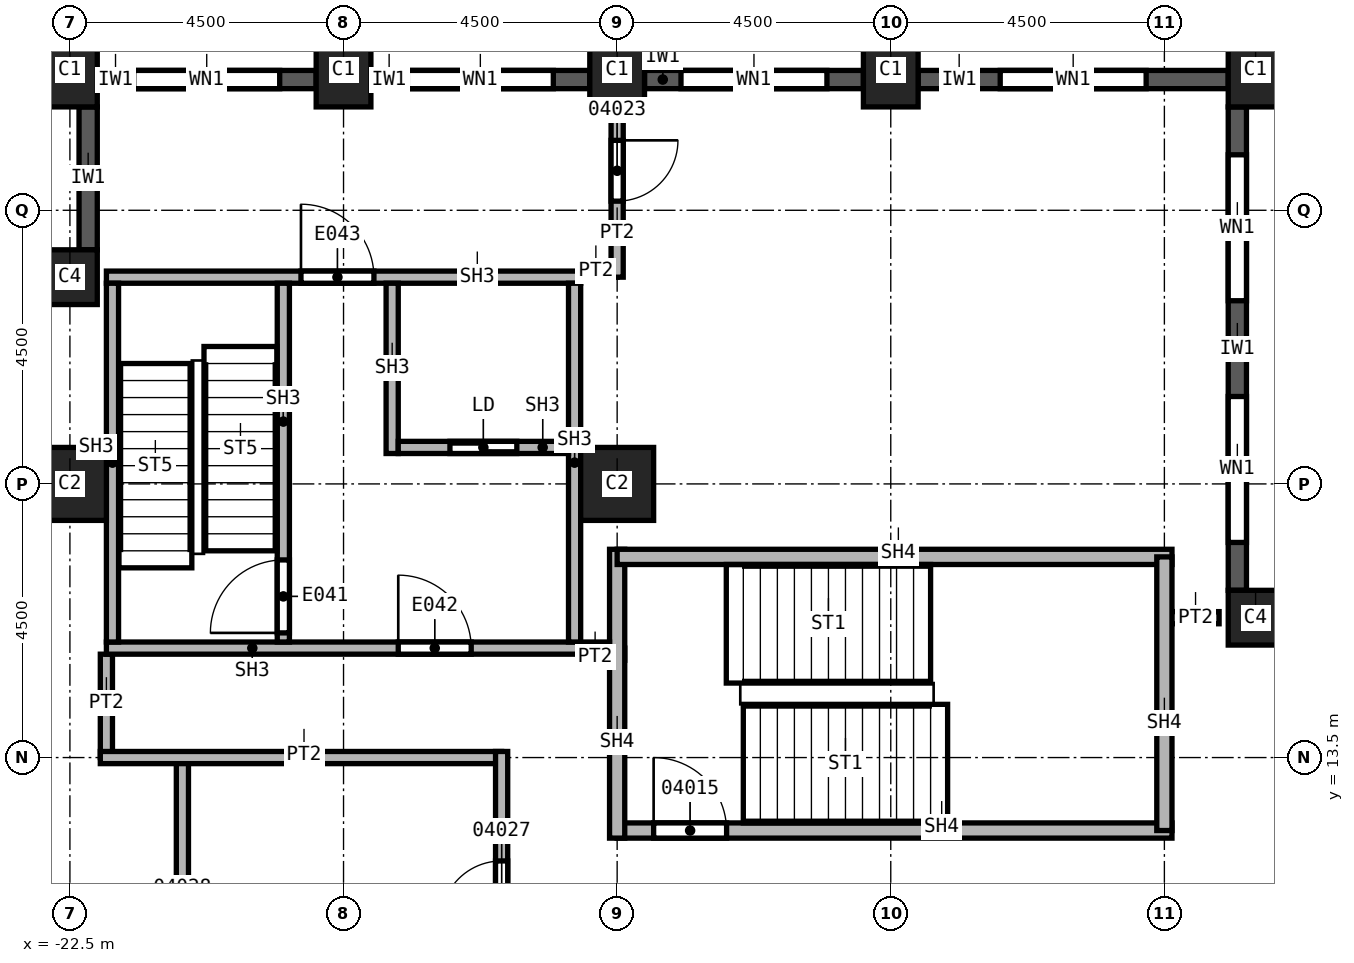
"""IFC4 building model, lengths in metres.
Left out: names, types, materials, properties, quantities, classifications, styles, units other than length and angle.
Written with IfcOpenShell. Run it as: python <this file> out.ifc"""

import sys

from ifc_helpers import new_model, si_unit, direction, frame, frame_2d, origin, origin_2d, place, context, subcontext, project, spatial, rectangle, extrude, element, fill, save


model = new_model("IFC4")
c1 = context("Model", 3, precision=1e-05, world=origin(), true_north=direction((0.0, 1.0)))
c2 = subcontext(c1, "Body", "Model", "MODEL_VIEW")
j1 = project(units=[si_unit("LENGTHUNIT", "METRE"), si_unit("PLANEANGLEUNIT", "RADIAN")], contexts=[c1])
p1 = place(None, origin())
s1 = spatial("IfcSite", under=j1, at=p1, CompositionType="ELEMENT")
p2 = place(p1, origin())
s2 = spatial("IfcBuilding", under=s1, at=p2, CompositionType="ELEMENT")
p3 = place(p2, frame((0.0, 0.0, 108.0)))
s3 = spatial("IfcBuildingStorey", under=s2, at=p3, CompositionType="ELEMENT", Elevation=108.0)
for number, where, z_axis, x_axis in (
    (1, (-13.5, 18.0, 0.0), (0.0, 0.0, 1.0), (1.0, 0.0, 0.0)),
    (2, (-22.5, 18.0, 0.0), (0.0, 0.0, 1.0), (1.0, 0.0, 0.0)),
):
    element("IfcColumn", number, at=place(p3, frame(where, z_axis=z_axis, x_axis=x_axis)), inside=s3, PredefinedType="COLUMN", context=c2, shape_type="SweptSolid", body=[
        extrude(rectangle(XDim=1.2, YDim=1.2, at=origin_2d()), origin(), (0.0, 0.0, 1.0), 3.7),
    ])
for number, where, z_axis, x_axis in (
    (3, (-3.0, 24.8, 0.0), (0.0, 0.0, 1.0), (1.0, 0.0, 0.0)),
    (4, (-9.0, 24.8, 0.0), (0.0, 0.0, 1.0), (1.0, 0.0, 0.0)),
    (5, (-13.5, 24.8, 0.0), (0.0, 0.0, 1.0), (1.0, 0.0, 0.0)),
    (6, (-18.0, 24.8, 0.0), (0.0, 0.0, 1.0), (1.0, 0.0, 0.0)),
    (7, (-22.5, 24.8, 0.0), (0.0, 0.0, 1.0), (1.0, 0.0, 0.0)),
):
    element("IfcColumn", number, at=place(p3, frame(where, z_axis=z_axis, x_axis=x_axis)), inside=s3, PredefinedType="COLUMN", context=c2, shape_type="SweptSolid", body=[
        extrude(rectangle(XDim=0.9, YDim=1.2, at=origin_2d()), origin(), (0.0, 0.0, 1.0), 3.7),
    ])
for number, where, z_axis, x_axis in (
    (8, (-3.0, 15.8, 0.0), (0.0, 0.0, 1.0), (1.0, 0.0, 0.0)),
    (9, (-22.5, 21.4, 0.0), (0.0, 0.0, 1.0), (1.0, 0.0, 0.0)),
):
    element("IfcColumn", number, at=place(p3, frame(where, z_axis=z_axis, x_axis=x_axis)), inside=s3, PredefinedType="COLUMN", context=c2, shape_type="SweptSolid", body=[
        extrude(rectangle(XDim=0.9, YDim=0.9, at=origin_2d()), origin(), (0.0, 0.0, 1.0), 3.7),
    ])
p4 = place(p3, frame((-22.2, 24.2, 0.0), z_axis=(0.0, 0.0, 1.0), x_axis=(0.0, -1.0, 0.0)))
e10 = element("IfcWall", 10, at=p4, inside=s3, PredefinedType="SOLIDWALL", context=c2, shape_type="SweptSolid", body=[
    extrude(rectangle(XDim=2.35, YDim=0.3, at=frame_2d((1.175, 0.0))), origin(), (0.0, 0.0, 1.0), 3.1),
])
p5 = place(p3, frame((-3.3, 16.25, 0.0), z_axis=(0.0, 0.0, 1.0), x_axis=(0.0, 1.0, 0.0)))
e11 = element("IfcWall", 11, at=p5, inside=s3, PredefinedType="SOLIDWALL", context=c2, shape_type="SweptSolid", body=[
    extrude(rectangle(XDim=7.95, YDim=0.3, at=frame_2d((3.975, 0.0))), origin(), (0.0, 0.0, 1.0), 3.1),
])
p6 = place(p5, frame((0.788, 0.0, 0.8)))
e12 = element("IfcOpeningElement", 12, at=p6, cuts=e11, PredefinedType="OPENING", context=c2, shape_type="SweptSolid", body=[
    extrude(rectangle(XDim=2.4, YDim=1.95, at=frame_2d((1.2, 0.975))), frame((0.0, 0.15, 0.0), z_axis=(0.0, -1.0, 0.0), x_axis=(1.0, 0.0, 0.0)), (0.0, 0.0, 1.0), 0.3),
])
p7 = place(p5, frame((4.762, 0.0, 0.8)))
e13 = element("IfcOpeningElement", 13, at=p7, cuts=e11, PredefinedType="OPENING", context=c2, shape_type="SweptSolid", body=[
    extrude(rectangle(XDim=2.4, YDim=1.95, at=frame_2d((1.2, 0.975))), frame((0.0, 0.15, 0.0), z_axis=(0.0, -1.0, 0.0), x_axis=(1.0, 0.0, 0.0)), (0.0, 0.0, 1.0), 0.3),
])
p8 = place(p3, frame((-3.45, 24.65, 0.0), z_axis=(0.0, 0.0, 1.0), x_axis=(-1.0, 0.0, 0.0)))
e14 = element("IfcWall", 14, at=p8, inside=s3, PredefinedType="SOLIDWALL", context=c2, shape_type="SweptSolid", body=[
    extrude(rectangle(XDim=5.1, YDim=0.3, at=frame_2d((2.55, 0.0))), origin(), (0.0, 0.0, 1.0), 3.1),
])
p9 = place(p8, frame((1.35, 0.0, 0.8)))
e15 = element("IfcOpeningElement", 15, at=p9, cuts=e14, PredefinedType="OPENING", context=c2, shape_type="SweptSolid", body=[
    extrude(rectangle(XDim=2.4, YDim=1.95, at=frame_2d((1.2, 0.975))), frame((0.0, 0.15, 0.0), z_axis=(0.0, -1.0, 0.0), x_axis=(1.0, 0.0, 0.0)), (0.0, 0.0, 1.0), 0.3),
])
p10 = place(p3, frame((-9.45, 24.65, 0.0), z_axis=(0.0, 0.0, 1.0), x_axis=(-1.0, 0.0, 0.0)))
e16 = element("IfcWall", 16, at=p10, inside=s3, PredefinedType="SOLIDWALL", context=c2, shape_type="SweptSolid", body=[
    extrude(rectangle(XDim=3.6, YDim=0.3, at=frame_2d((1.8, 0.0))), origin(), (0.0, 0.0, 1.0), 3.1),
])
p11 = place(p10, frame((0.6, 0.0, 0.8)))
e17 = element("IfcOpeningElement", 17, at=p11, cuts=e16, PredefinedType="OPENING", context=c2, shape_type="SweptSolid", body=[
    extrude(rectangle(XDim=2.4, YDim=1.95, at=frame_2d((1.2, 0.975))), frame((0.0, 0.15, 0.0), z_axis=(0.0, -1.0, 0.0), x_axis=(1.0, 0.0, 0.0)), (0.0, 0.0, 1.0), 0.3),
])
p12 = place(p3, frame((-13.95, 24.65, 0.0), z_axis=(0.0, 0.0, 1.0), x_axis=(-1.0, 0.0, 0.0)))
e18 = element("IfcWall", 18, at=p12, inside=s3, PredefinedType="SOLIDWALL", context=c2, shape_type="SweptSolid", body=[
    extrude(rectangle(XDim=3.6, YDim=0.3, at=frame_2d((1.8, 0.0))), origin(), (0.0, 0.0, 1.0), 3.1),
])
p13 = place(p12, frame((0.6, 0.0, 0.8)))
e19 = element("IfcOpeningElement", 19, at=p13, cuts=e18, PredefinedType="OPENING", context=c2, shape_type="SweptSolid", body=[
    extrude(rectangle(XDim=2.4, YDim=1.95, at=frame_2d((1.2, 0.975))), frame((0.0, 0.15, 0.0), z_axis=(0.0, -1.0, 0.0), x_axis=(1.0, 0.0, 0.0)), (0.0, 0.0, 1.0), 0.3),
])
p14 = place(p3, frame((-18.45, 24.65, 0.0), z_axis=(0.0, 0.0, 1.0), x_axis=(-1.0, 0.0, 0.0)))
e20 = element("IfcWall", 20, at=p14, inside=s3, PredefinedType="SOLIDWALL", context=c2, shape_type="SweptSolid", body=[
    extrude(rectangle(XDim=3.6, YDim=0.3, at=frame_2d((1.8, 0.0))), origin(), (0.0, 0.0, 1.0), 3.1),
])
p15 = place(p14, frame((0.6, 0.0, 0.8)))
e21 = element("IfcOpeningElement", 21, at=p15, cuts=e20, PredefinedType="OPENING", context=c2, shape_type="SweptSolid", body=[
    extrude(rectangle(XDim=2.4, YDim=1.95, at=frame_2d((1.2, 0.975))), frame((0.0, 0.15, 0.0), z_axis=(0.0, -1.0, 0.0), x_axis=(1.0, 0.0, 0.0)), (0.0, 0.0, 1.0), 0.3),
])
p16 = place(p3, frame((-21.9, 13.5, 0.0), z_axis=(0.0, 0.0, 1.0), x_axis=(0.0, 1.0, 0.0)))
e22 = element("IfcWall", 22, at=p16, inside=s3, PredefinedType="PARTITIONING", context=c2, shape_type="SweptSolid", body=[
    extrude(rectangle(XDim=1.7, YDim=0.2, at=frame_2d((0.85, 0.0))), origin(), (0.0, 0.0, 1.0), 3.7),
])
p17 = place(p3, frame((-20.65, 3.75, 0.0), z_axis=(0.0, 0.0, 1.0), x_axis=(0.0, 1.0, 0.0)))
e23 = element("IfcWall", 23, at=p17, inside=s3, PredefinedType="PARTITIONING", context=c2, shape_type="SweptSolid", body=[
    extrude(rectangle(XDim=9.75, YDim=0.2, at=frame_2d((4.875, 0.0))), origin(), (0.0, 0.0, 1.0), 3.7),
])
p18 = place(p17, frame((6.1, 0.0, 0.0)))
e24 = element("IfcOpeningElement", 24, at=p18, cuts=e23, PredefinedType="OPENING", context=c2, shape_type="SweptSolid", body=[
    extrude(rectangle(XDim=1.0, YDim=2.1, at=frame_2d((0.5, 1.05))), frame((0.0, 0.1, 0.0), z_axis=(0.0, -1.0, 0.0), x_axis=(1.0, 0.0, 0.0)), (0.0, 0.0, 1.0), 0.2),
])
p19 = place(p3, frame((-15.4, 13.5, 0.0), z_axis=(0.0, 0.0, 1.0), x_axis=(-1.0, 0.0, 0.0)))
e25 = element("IfcWall", 25, at=p19, inside=s3, PredefinedType="PARTITIONING", context=c2, shape_type="SweptSolid", body=[
    extrude(rectangle(XDim=6.6, YDim=0.2, at=frame_2d((3.3, 0.0))), origin(), (0.0, 0.0, 1.0), 3.7),
])
p20 = place(p3, frame((-15.4, 3.65, 0.0), z_axis=(0.0, 0.0, 1.0), x_axis=(0.0, 1.0, 0.0)))
e26 = element("IfcWall", 26, at=p20, inside=s3, PredefinedType="PARTITIONING", context=c2, shape_type="SweptSolid", body=[
    extrude(rectangle(XDim=9.95, YDim=0.2, at=frame_2d((4.975, 0.0))), origin(), (0.0, 0.0, 1.0), 3.7),
])
p21 = place(p20, frame((7.15, 0.0, 0.0)))
e27 = element("IfcOpeningElement", 27, at=p21, cuts=e26, PredefinedType="OPENING", context=c2, shape_type="SweptSolid", body=[
    extrude(rectangle(XDim=1.0, YDim=2.1, at=frame_2d((0.5, 1.05))), frame((0.0, 0.1, 0.0), z_axis=(0.0, -1.0, 0.0), x_axis=(1.0, 0.0, 0.0)), (0.0, 0.0, 1.0), 0.2),
])
p22 = place(p3, frame((-14.1, 15.2, 0.0), z_axis=(0.0, 0.0, 1.0), x_axis=(1.0, 0.0, 0.0)))
e28 = element("IfcWall", 28, at=p22, inside=s3, PredefinedType="PARTITIONING", context=c2, shape_type="SweptSolid", body=[
    extrude(rectangle(XDim=0.725, YDim=0.2, at=frame_2d((0.363, 0.0))), origin(), (0.0, 0.0, 1.0), 3.7),
])
p23 = place(p3, frame((-13.5, 21.5, 0.0), z_axis=(0.0, 0.0, 1.0), x_axis=(-1.0, 0.0, 0.0)))
e29 = element("IfcWall", 29, at=p23, inside=s3, PredefinedType="PARTITIONING", context=c2, shape_type="SweptSolid", body=[
    extrude(rectangle(XDim=0.6, YDim=0.2, at=frame_2d((0.3, 0.0))), origin(), (0.0, 0.0, 1.0), 3.7),
])
p24 = place(p3, frame((-13.5, 24.2, 0.0), z_axis=(0.0, 0.0, 1.0), x_axis=(0.0, -1.0, 0.0)))
e30 = element("IfcWall", 30, at=p24, inside=s3, PredefinedType="PARTITIONING", context=c2, shape_type="SweptSolid", body=[
    extrude(rectangle(XDim=2.8, YDim=0.2, at=frame_2d((1.4, 0.0))), origin(), (0.0, 0.0, 1.0), 3.7),
])
p25 = place(p24, frame((0.55, 0.0, 0.0)))
e31 = element("IfcOpeningElement", 31, at=p25, cuts=e30, PredefinedType="OPENING", context=c2, shape_type="SweptSolid", body=[
    extrude(rectangle(XDim=1.0, YDim=2.1, at=frame_2d((0.5, 1.05))), frame((0.0, 0.1, 0.0), z_axis=(0.0, -1.0, 0.0), x_axis=(1.0, 0.0, 0.0)), (0.0, 0.0, 1.0), 0.2),
])
p26 = place(p3, frame((-4.5, 15.8, 0.0), z_axis=(0.0, 0.0, 1.0), x_axis=(1.0, 0.0, 0.0)))
e32 = element("IfcWall", 32, at=p26, inside=s3, PredefinedType="PARTITIONING", context=c2, shape_type="SweptSolid", body=[
    extrude(rectangle(XDim=0.9, YDim=0.2, at=frame_2d((0.45, 0.0))), origin(), (0.0, 0.0, 1.0), 3.7),
])
p27 = place(p3, frame((-13.5, 12.3, 0.0), z_axis=(0.0, 0.0, 1.0), x_axis=(1.0, 0.0, 0.0)))
e33 = element("IfcWall", 33, at=p27, inside=s3, PredefinedType="SOLIDWALL", context=c2, shape_type="SweptSolid", body=[
    extrude(rectangle(XDim=9.125, YDim=0.25, at=frame_2d((4.562, 0.0))), origin(), (0.0, 0.0, 1.0), 3.7),
])
p28 = place(p27, frame((0.6, 0.0, 0.0)))
e34 = element("IfcOpeningElement", 34, at=p28, cuts=e33, PredefinedType="OPENING", context=c2, shape_type="SweptSolid", body=[
    extrude(rectangle(XDim=1.2, YDim=2.1, at=frame_2d((0.6, 1.05))), frame((0.0, 0.125, 0.0), z_axis=(0.0, -1.0, 0.0), x_axis=(1.0, 0.0, 0.0)), (0.0, 0.0, 1.0), 0.25),
])
p29 = place(p3, frame((-13.5, 12.175, 0.0), z_axis=(0.0, 0.0, 1.0), x_axis=(0.0, 1.0, 0.0)))
e35 = element("IfcWall", 35, at=p29, inside=s3, PredefinedType="SOLIDWALL", context=c2, shape_type="SweptSolid", body=[
    extrude(rectangle(XDim=4.75, YDim=0.25, at=frame_2d((2.375, 0.0))), origin(), (0.0, 0.0, 1.0), 3.7),
])
p30 = place(p3, frame((-13.5, 16.8, 0.0), z_axis=(0.0, 0.0, 1.0), x_axis=(1.0, 0.0, 0.0)))
e36 = element("IfcWall", 36, at=p30, inside=s3, PredefinedType="SOLIDWALL", context=c2, shape_type="SweptSolid", body=[
    extrude(rectangle(XDim=9.125, YDim=0.25, at=frame_2d((4.562, 0.0))), origin(), (0.0, 0.0, 1.0), 3.7),
])
p31 = place(p3, frame((-4.5, 16.8, 0.0), z_axis=(0.0, 0.0, 1.0), x_axis=(0.0, -1.0, 0.0)))
e37 = element("IfcWall", 37, at=p31, inside=s3, PredefinedType="SOLIDWALL", context=c2, shape_type="SweptSolid", body=[
    extrude(rectangle(XDim=4.5, YDim=0.25, at=frame_2d((2.25, 0.0))), origin(), (0.0, 0.0, 1.0), 3.7),
])
p32 = place(p3, frame((-21.9, 15.3, 0.0), z_axis=(0.0, 0.0, 1.0), x_axis=(1.0, 0.0, 0.0)))
e38 = element("IfcWall", 38, at=p32, inside=s3, PredefinedType="SOLIDWALL", context=c2, shape_type="SweptSolid", body=[
    extrude(rectangle(XDim=8.275, YDim=0.2, at=frame_2d((4.137, 0.0))), origin(), (0.0, 0.0, 1.0), 3.7),
])
p33 = place(p32, frame((4.8, 0.0, 0.0)))
e39 = element("IfcOpeningElement", 39, at=p33, cuts=e38, PredefinedType="OPENING", context=c2, shape_type="SweptSolid", body=[
    extrude(rectangle(XDim=1.2, YDim=2.1, at=frame_2d((0.6, 1.05))), frame((0.0, 0.1, 0.0), z_axis=(0.0, -1.0, 0.0), x_axis=(1.0, 0.0, 0.0)), (0.0, 0.0, 1.0), 0.2),
])
p34 = place(p3, frame((-21.9, 21.4, 0.0), z_axis=(0.0, 0.0, 1.0), x_axis=(1.0, 0.0, 0.0)))
e40 = element("IfcWall", 40, at=p34, inside=s3, PredefinedType="SOLIDWALL", context=c2, shape_type="SweptSolid", body=[
    extrude(rectangle(XDim=7.8, YDim=0.2, at=frame_2d((3.9, 0.0))), origin(), (0.0, 0.0, 1.0), 3.7),
])
p35 = place(p34, frame((3.2, 0.0, 0.0)))
e41 = element("IfcOpeningElement", 41, at=p35, cuts=e40, PredefinedType="OPENING", context=c2, shape_type="SweptSolid", body=[
    extrude(rectangle(XDim=1.2, YDim=2.1, at=frame_2d((0.6, 1.05))), frame((0.0, 0.1, 0.0), z_axis=(0.0, -1.0, 0.0), x_axis=(1.0, 0.0, 0.0)), (0.0, 0.0, 1.0), 0.2),
])
for number, where, z_axis, x_axis in (
    (42, (-21.8, 15.4, 0.0), (0.0, 0.0, 1.0), (0.0, 1.0, 0.0)),
    (43, (-14.2, 15.4, 0.0), (0.0, 0.0, 1.0), (0.0, 1.0, 0.0)),
):
    element("IfcWall", number, at=place(p3, frame(where, z_axis=z_axis, x_axis=x_axis)), inside=s3, PredefinedType="SOLIDWALL", context=c2, shape_type="SweptSolid", body=[
        extrude(rectangle(XDim=5.9, YDim=0.2, at=frame_2d((2.95, 0.0))), origin(), (0.0, 0.0, 1.0), 3.7),
    ])
p36 = place(p3, frame((-18.99, 15.4, 0.0), z_axis=(0.0, 0.0, 1.0), x_axis=(0.0, 1.0, 0.0)))
e44 = element("IfcWall", 44, at=p36, inside=s3, PredefinedType="SOLIDWALL", context=c2, shape_type="SweptSolid", body=[
    extrude(rectangle(XDim=5.9, YDim=0.2, at=frame_2d((2.95, 0.0))), origin(), (0.0, 0.0, 1.0), 3.7),
])
p37 = place(p36, frame((0.15, 0.0, 0.0)))
e45 = element("IfcOpeningElement", 45, at=p37, cuts=e44, PredefinedType="OPENING", context=c2, shape_type="SweptSolid", body=[
    extrude(rectangle(XDim=1.2, YDim=2.1, at=frame_2d((0.6, 1.05))), frame((0.0, 0.1, 0.0), z_axis=(0.0, -1.0, 0.0), x_axis=(1.0, 0.0, 0.0)), (0.0, 0.0, 1.0), 0.2),
])
p38 = place(p3, frame((-17.2, 18.5, 0.0), z_axis=(0.0, 0.0, 1.0), x_axis=(0.0, 1.0, 0.0)))
e46 = element("IfcWall", 46, at=p38, inside=s3, PredefinedType="SOLIDWALL", context=c2, shape_type="SweptSolid", body=[
    extrude(rectangle(XDim=2.8, YDim=0.2, at=frame_2d((1.4, 0.0))), origin(), (0.0, 0.0, 1.0), 3.7),
])
p39 = place(p3, frame((-17.1, 18.6, 0.0), z_axis=(0.0, 0.0, 1.0), x_axis=(1.0, 0.0, 0.0)))
e47 = element("IfcWall", 47, at=p39, inside=s3, PredefinedType="SOLIDWALL", context=c2, shape_type="SweptSolid", body=[
    extrude(rectangle(XDim=2.8, YDim=0.2, at=frame_2d((1.4, 0.0))), origin(), (0.0, 0.0, 1.0), 3.7),
])
p40 = place(p39, frame((0.85, 0.0, 0.0)))
e48 = element("IfcOpeningElement", 48, at=p40, cuts=e47, PredefinedType="OPENING", context=c2, shape_type="SweptSolid", body=[
    extrude(rectangle(XDim=1.1, YDim=2.1, at=frame_2d((0.55, 1.05))), frame((0.0, 0.1, 0.0), z_axis=(0.0, -1.0, 0.0), x_axis=(1.0, 0.0, 0.0)), (0.0, 0.0, 1.0), 0.2),
])
p41 = place(p6, origin())
e49 = element("IfcWindow", 49, at=p41, inside=s3, PartitioningType="SINGLE_PANEL", PredefinedType="WINDOW", context=c2, shape_type="SweptSolid", body=[
    extrude(rectangle(XDim=2.4, YDim=1.95, at=frame_2d((1.2, 0.975))), frame((0.0, 0.03, 0.0), z_axis=(0.0, -1.0, 0.0), x_axis=(1.0, 0.0, 0.0)), (0.0, 0.0, 1.0), 0.06),
])
fill(e12, e49)
p42 = place(p7, origin())
e50 = element("IfcWindow", 50, at=p42, inside=s3, PartitioningType="SINGLE_PANEL", PredefinedType="WINDOW", context=c2, shape_type="SweptSolid", body=[
    extrude(rectangle(XDim=2.4, YDim=1.95, at=frame_2d((1.2, 0.975))), frame((0.0, 0.03, 0.0), z_axis=(0.0, -1.0, 0.0), x_axis=(1.0, 0.0, 0.0)), (0.0, 0.0, 1.0), 0.06),
])
fill(e13, e50)
p43 = place(p9, origin())
e51 = element("IfcWindow", 51, at=p43, inside=s3, PartitioningType="SINGLE_PANEL", PredefinedType="WINDOW", context=c2, shape_type="SweptSolid", body=[
    extrude(rectangle(XDim=2.4, YDim=1.95, at=frame_2d((1.2, 0.975))), frame((0.0, 0.03, 0.0), z_axis=(0.0, -1.0, 0.0), x_axis=(1.0, 0.0, 0.0)), (0.0, 0.0, 1.0), 0.06),
])
fill(e15, e51)
p44 = place(p11, origin())
e52 = element("IfcWindow", 52, at=p44, inside=s3, PartitioningType="SINGLE_PANEL", PredefinedType="WINDOW", context=c2, shape_type="SweptSolid", body=[
    extrude(rectangle(XDim=2.4, YDim=1.95, at=frame_2d((1.2, 0.975))), frame((0.0, 0.03, 0.0), z_axis=(0.0, -1.0, 0.0), x_axis=(1.0, 0.0, 0.0)), (0.0, 0.0, 1.0), 0.06),
])
fill(e17, e52)
p45 = place(p13, origin())
e53 = element("IfcWindow", 53, at=p45, inside=s3, PartitioningType="SINGLE_PANEL", PredefinedType="WINDOW", context=c2, shape_type="SweptSolid", body=[
    extrude(rectangle(XDim=2.4, YDim=1.95, at=frame_2d((1.2, 0.975))), frame((0.0, 0.03, 0.0), z_axis=(0.0, -1.0, 0.0), x_axis=(1.0, 0.0, 0.0)), (0.0, 0.0, 1.0), 0.06),
])
fill(e19, e53)
p46 = place(p15, origin())
e54 = element("IfcWindow", 54, at=p46, inside=s3, PartitioningType="SINGLE_PANEL", PredefinedType="WINDOW", context=c2, shape_type="SweptSolid", body=[
    extrude(rectangle(XDim=2.4, YDim=1.95, at=frame_2d((1.2, 0.975))), frame((0.0, 0.03, 0.0), z_axis=(0.0, -1.0, 0.0), x_axis=(1.0, 0.0, 0.0)), (0.0, 0.0, 1.0), 0.06),
])
fill(e21, e54)
p47 = place(p28, origin())
e55 = element("IfcDoor", 55, at=p47, inside=s3, OperationType="SINGLE_SWING_RIGHT", PredefinedType="DOOR", context=c2, shape_type="SweptSolid", body=[
    extrude(rectangle(XDim=1.2, YDim=2.1, at=frame_2d((0.6, 1.05))), frame((0.0, 0.025, 0.0), z_axis=(0.0, -1.0, 0.0), x_axis=(1.0, 0.0, 0.0)), (0.0, 0.0, 1.0), 0.05),
])
fill(e34, e55)
p48 = place(p25, origin())
e56 = element("IfcDoor", 56, at=p48, inside=s3, OperationType="SINGLE_SWING_RIGHT", PredefinedType="DOOR", context=c2, shape_type="SweptSolid", body=[
    extrude(rectangle(XDim=1.0, YDim=2.1, at=frame_2d((0.5, 1.05))), frame((0.0, 0.025, 0.0), z_axis=(0.0, -1.0, 0.0), x_axis=(1.0, 0.0, 0.0)), (0.0, 0.0, 1.0), 0.05),
])
fill(e31, e56)
p49 = place(p21, origin())
e57 = element("IfcDoor", 57, at=p49, inside=s3, OperationType="SINGLE_SWING_RIGHT", PredefinedType="DOOR", context=c2, shape_type="SweptSolid", body=[
    extrude(rectangle(XDim=1.0, YDim=2.1, at=frame_2d((0.5, 1.05))), frame((0.0, 0.025, 0.0), z_axis=(0.0, -1.0, 0.0), x_axis=(1.0, 0.0, 0.0)), (0.0, 0.0, 1.0), 0.05),
])
fill(e27, e57)
p50 = place(p37, origin())
e58 = element("IfcDoor", 58, at=p50, inside=s3, OperationType="SINGLE_SWING_LEFT", PredefinedType="DOOR", context=c2, shape_type="SweptSolid", body=[
    extrude(rectangle(XDim=1.2, YDim=2.1, at=frame_2d((0.6, 1.05))), frame((0.0, 0.025, 0.0), z_axis=(0.0, -1.0, 0.0), x_axis=(1.0, 0.0, 0.0)), (0.0, 0.0, 1.0), 0.05),
])
fill(e45, e58)
p51 = place(p40, origin())
e59 = element("IfcDoor", 59, at=p51, inside=s3, OperationType="SLIDING_TO_LEFT", PredefinedType="DOOR", context=c2, shape_type="SweptSolid", body=[
    extrude(rectangle(XDim=1.1, YDim=2.1, at=frame_2d((0.55, 1.05))), frame((0.0, 0.025, 0.0), z_axis=(0.0, -1.0, 0.0), x_axis=(1.0, 0.0, 0.0)), (0.0, 0.0, 1.0), 0.05),
])
fill(e48, e59)
p52 = place(p33, origin())
e60 = element("IfcDoor", 60, at=p52, inside=s3, OperationType="SINGLE_SWING_RIGHT", PredefinedType="DOOR", context=c2, shape_type="SweptSolid", body=[
    extrude(rectangle(XDim=1.2, YDim=2.1, at=frame_2d((0.6, 1.05))), frame((0.0, 0.025, 0.0), z_axis=(0.0, -1.0, 0.0), x_axis=(1.0, 0.0, 0.0)), (0.0, 0.0, 1.0), 0.05),
])
fill(e39, e60)
p53 = place(p35, origin())
e61 = element("IfcDoor", 61, at=p53, inside=s3, OperationType="SINGLE_SWING_LEFT", PredefinedType="DOOR", context=c2, shape_type="SweptSolid", body=[
    extrude(rectangle(XDim=1.2, YDim=2.1, at=frame_2d((0.6, 1.05))), frame((0.0, 0.025, 0.0), z_axis=(0.0, -1.0, 0.0), x_axis=(1.0, 0.0, 0.0)), (0.0, 0.0, 1.0), 0.05),
])
fill(e41, e61)
save(model, sys.argv[1])
